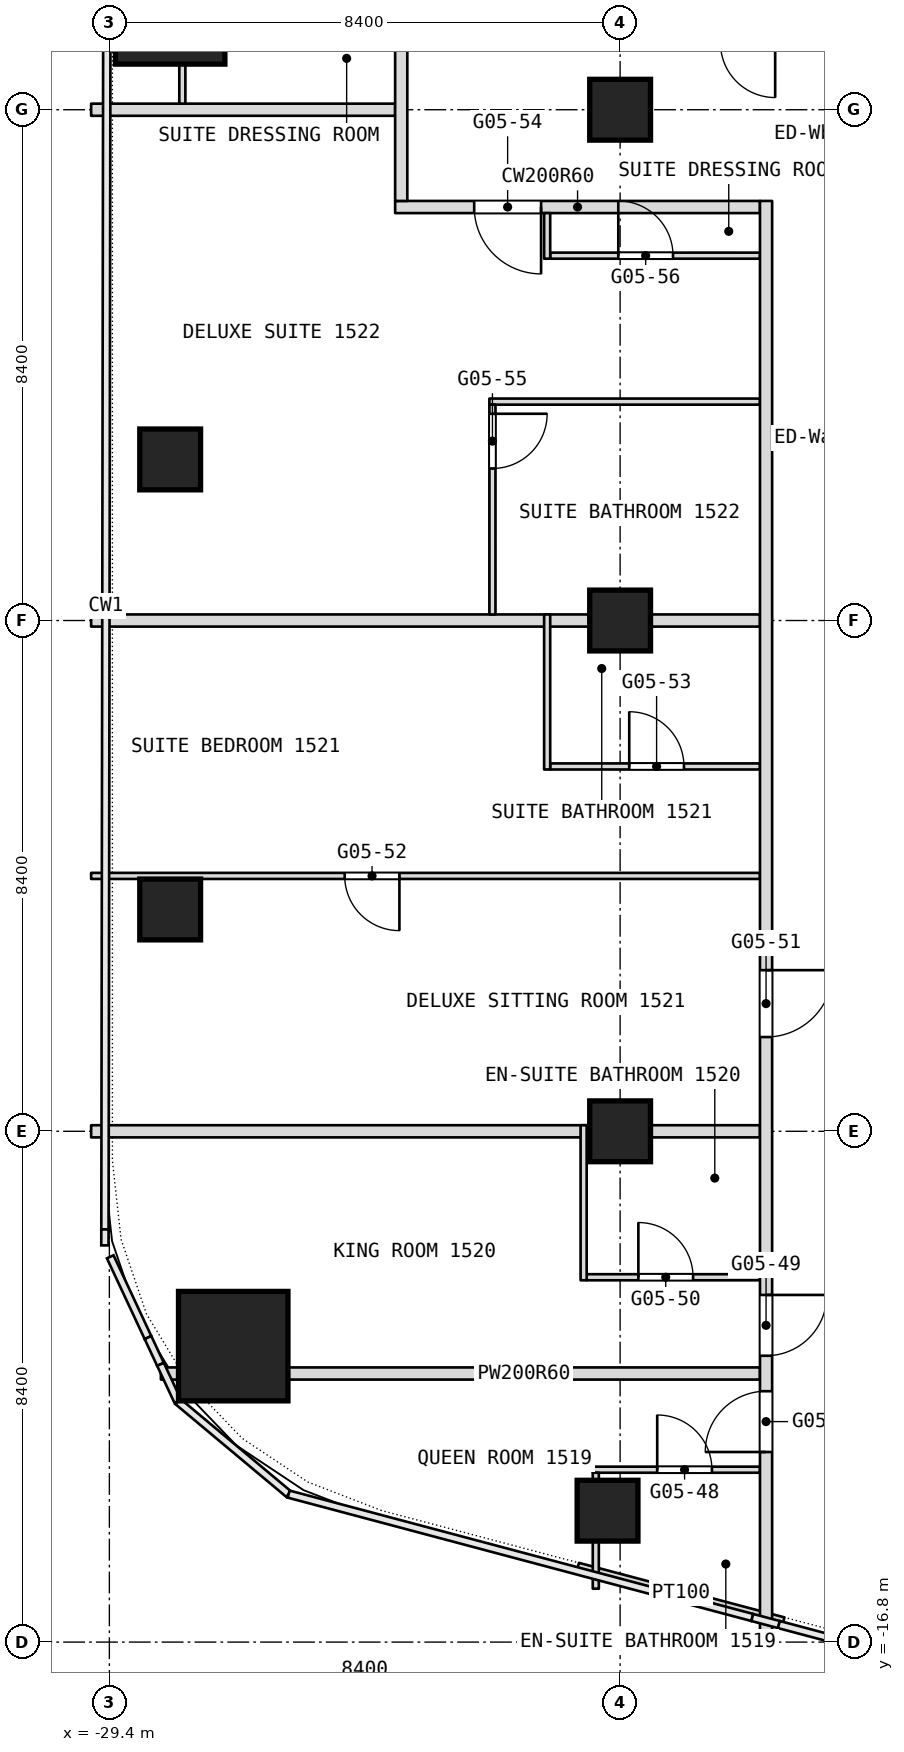
"""IFC4 building model, lengths in metres.
Left out: names, types, materials, properties, quantities, classifications, styles, units other than length and angle.
Written with IfcOpenShell. Run it as: python <this file> out.ifc"""

import sys

from ifc_helpers import new_model, si_unit, direction, frame, frame_2d, origin, origin_2d, place, context, subcontext, project, spatial, rectangle, extrude, element, fill, save


model = new_model("IFC4")
c1 = context("Model", 3, precision=1e-05, world=origin(), true_north=direction((0.0, 1.0)))
c2 = subcontext(c1, "Body", "Model", "MODEL_VIEW")
j1 = project(units=[si_unit("LENGTHUNIT", "METRE"), si_unit("PLANEANGLEUNIT", "RADIAN")], contexts=[c1])
p1 = place(None, origin())
s1 = spatial("IfcSite", under=j1, at=p1, CompositionType="ELEMENT")
p2 = place(p1, origin())
s2 = spatial("IfcBuilding", under=s1, at=p2, CompositionType="ELEMENT")
p3 = place(p2, frame((0.0, 0.0, 68.9)))
s3 = spatial("IfcBuildingStorey", under=s2, at=p3, CompositionType="ELEMENT", Elevation=68.9)
for number, where, z_axis, x_axis in (
    (1, (-27.363, -11.933, 0.0), (0.0, 0.0, 1.0), (1.0, 0.0, 0.0)),
    (2, (-28.4, 10.05, 0.0), (0.0, 0.0, 1.0), (1.0, 0.0, 0.0)),
):
    element("IfcColumn", number, at=place(p3, frame(where, z_axis=z_axis, x_axis=x_axis)), inside=s3, PredefinedType="COLUMN", context=c2, shape_type="SweptSolid", body=[
        extrude(rectangle(XDim=1.8, YDim=1.8, at=origin_2d()), origin(), (0.0, 0.0, 1.0), 3.6),
    ])
for number, where, z_axis, x_axis in (
    (3, (-21.0, -8.4, 0.0), (0.0, 0.0, 1.0), (1.0, 0.0, 0.0)),
    (4, (-21.0, 0.0, 0.0), (0.0, 0.0, 1.0), (1.0, 0.0, 0.0)),
    (5, (-21.0, 8.4, 0.0), (0.0, 0.0, 1.0), (1.0, 0.0, 0.0)),
    (6, (-28.4, -4.752, 0.0), (0.0, 0.0, 1.0), (1.0, 0.0, 0.0)),
    (7, (-28.4, 2.649, 0.0), (0.0, 0.0, 1.0), (1.0, 0.0, 0.0)),
    (8, (-21.207, -14.639, 0.0), (0.0, 0.0, 1.0), (1.0, 0.0, 0.0)),
):
    element("IfcColumn", number, at=place(p3, frame(where, z_axis=z_axis, x_axis=x_axis)), inside=s3, PredefinedType="COLUMN", context=c2, shape_type="SweptSolid", body=[
        extrude(rectangle(XDim=1.0, YDim=1.0, at=origin_2d()), origin(), (0.0, 0.0, 1.0), 3.6),
    ])
p4 = place(p3, frame((-21.69, -15.545, 0.0), z_axis=(0.0, 0.0, 1.0), x_axis=(0.966542484633, -0.25650657964, 0.0)))
e9 = element("IfcWall", 9, at=p4, inside=s3, PredefinedType="PARTITIONING", context=c2, shape_type="SweptSolid", body=[
    extrude(rectangle(XDim=3.497, YDim=0.1, at=frame_2d((1.749, 0.0))), origin(), (0.0, 0.0, 1.0), 3.34),
])
p5 = place(p3, frame((-21.45, -13.965, 0.0), z_axis=(0.0, 0.0, 1.0), x_axis=(1.0, 0.0, 0.0)))
e10 = element("IfcWall", 10, at=p5, inside=s3, PredefinedType="PARTITIONING", context=c2, shape_type="SweptSolid", body=[
    extrude(rectangle(XDim=2.75, YDim=0.1, at=frame_2d((1.375, 0.0))), origin(), (0.0, 0.0, 1.0), 3.34),
])
p6 = place(p5, frame((1.06, 0.0, 0.0)))
e11 = element("IfcOpeningElement", 11, at=p6, cuts=e10, PredefinedType="OPENING", context=c2, shape_type="SweptSolid", body=[
    extrude(rectangle(XDim=0.9, YDim=2.1, at=frame_2d((0.45, 1.05))), frame((0.0, 0.05, 0.0), z_axis=(0.0, -1.0, 0.0), x_axis=(1.0, 0.0, 0.0)), (0.0, 0.0, 1.0), 0.1),
])
p7 = place(p3, frame((-28.553, -12.383, 0.0), z_axis=(0.0, 0.0, 1.0), x_axis=(1.0, 0.0, 0.0)))
e12 = element("IfcWall", 12, at=p7, inside=s3, PredefinedType="PARTITIONING", context=c2, shape_type="SweptSolid", body=[
    extrude(rectangle(XDim=0.29, YDim=0.2, at=frame_2d((0.145, 0.0))), origin(), (0.0, 0.0, 1.0), 3.34),
])
p8 = place(p3, frame((-26.463, -12.383, 0.0), z_axis=(0.0, 0.0, 1.0), x_axis=(1.0, 0.0, 0.0)))
e13 = element("IfcWall", 13, at=p8, inside=s3, PredefinedType="PARTITIONING", context=c2, shape_type="SweptSolid", body=[
    extrude(rectangle(XDim=7.763, YDim=0.2, at=frame_2d((3.881, 0.0))), origin(), (0.0, 0.0, 1.0), 3.34),
])
p9 = place(p3, frame((-21.55, -10.8, 0.0), z_axis=(0.0, 0.0, 1.0), x_axis=(1.0, 0.0, 0.0)))
e14 = element("IfcWall", 14, at=p9, inside=s3, PredefinedType="PARTITIONING", context=c2, shape_type="SweptSolid", body=[
    extrude(rectangle(XDim=2.85, YDim=0.1, at=frame_2d((1.425, 0.0))), origin(), (0.0, 0.0, 1.0), 3.34),
])
p10 = place(p9, frame((0.85, 0.0, 0.0)))
e15 = element("IfcOpeningElement", 15, at=p10, cuts=e14, PredefinedType="OPENING", context=c2, shape_type="SweptSolid", body=[
    extrude(rectangle(XDim=0.9, YDim=2.1, at=frame_2d((0.45, 1.05))), frame((0.0, 0.05, 0.0), z_axis=(0.0, -1.0, 0.0), x_axis=(1.0, 0.0, 0.0)), (0.0, 0.0, 1.0), 0.1),
])
p11 = place(p3, frame((-29.7, -8.4, 0.0), z_axis=(0.0, 0.0, 1.0), x_axis=(1.0, 0.0, 0.0)))
e16 = element("IfcWall", 16, at=p11, inside=s3, PredefinedType="PARTITIONING", context=c2, shape_type="SweptSolid", body=[
    extrude(rectangle(XDim=11.0, YDim=0.2, at=frame_2d((5.5, 0.0))), origin(), (0.0, 0.0, 1.0), 2.84),
])
p12 = place(p3, frame((-29.7, -4.2, 0.0), z_axis=(0.0, 0.0, 1.0), x_axis=(1.0, 0.0, 0.0)))
e17 = element("IfcWall", 17, at=p12, inside=s3, PredefinedType="PARTITIONING", context=c2, shape_type="SweptSolid", body=[
    extrude(rectangle(XDim=11.0, YDim=0.1, at=frame_2d((5.5, 0.0))), origin(), (0.0, 0.0, 1.0), 3.34),
])
p13 = place(p12, frame((4.17, 0.0, 0.0)))
e18 = element("IfcOpeningElement", 18, at=p13, cuts=e17, PredefinedType="OPENING", context=c2, shape_type="SweptSolid", body=[
    extrude(rectangle(XDim=0.9, YDim=2.1, at=frame_2d((0.45, 1.05))), frame((0.0, 0.05, 0.0), z_axis=(0.0, -1.0, 0.0), x_axis=(1.0, 0.0, 0.0)), (0.0, 0.0, 1.0), 0.1),
])
p14 = place(p3, frame((-22.15, -2.4, 0.0), z_axis=(0.0, 0.0, 1.0), x_axis=(1.0, 0.0, 0.0)))
e19 = element("IfcWall", 19, at=p14, inside=s3, PredefinedType="PARTITIONING", context=c2, shape_type="SweptSolid", body=[
    extrude(rectangle(XDim=3.45, YDim=0.1, at=frame_2d((1.725, 0.0))), origin(), (0.0, 0.0, 1.0), 3.34),
])
p15 = place(p14, frame((1.3, 0.0, 0.0)))
e20 = element("IfcOpeningElement", 20, at=p15, cuts=e19, PredefinedType="OPENING", context=c2, shape_type="SweptSolid", body=[
    extrude(rectangle(XDim=0.9, YDim=2.1, at=frame_2d((0.45, 1.05))), frame((0.0, 0.05, 0.0), z_axis=(0.0, -1.0, 0.0), x_axis=(1.0, 0.0, 0.0)), (0.0, 0.0, 1.0), 0.1),
])
p16 = place(p3, frame((-29.7, 0.0, 0.0), z_axis=(0.0, 0.0, 1.0), x_axis=(1.0, 0.0, 0.0)))
e21 = element("IfcWall", 21, at=p16, inside=s3, PredefinedType="PARTITIONING", context=c2, shape_type="SweptSolid", body=[
    extrude(rectangle(XDim=11.0, YDim=0.2, at=frame_2d((5.5, 0.0))), origin(), (0.0, 0.0, 1.0), 2.84),
])
p17 = place(p3, frame((-23.15, 3.6, 0.0), z_axis=(0.0, 0.0, 1.0), x_axis=(1.0, 0.0, 0.0)))
e22 = element("IfcWall", 22, at=p17, inside=s3, PredefinedType="PARTITIONING", context=c2, shape_type="SweptSolid", body=[
    extrude(rectangle(XDim=4.45, YDim=0.1, at=frame_2d((2.225, 0.0))), origin(), (0.0, 0.0, 1.0), 3.34),
])
p18 = place(p3, frame((-22.15, 6.0, 0.0), z_axis=(0.0, 0.0, 1.0), x_axis=(1.0, 0.0, 0.0)))
e23 = element("IfcWall", 23, at=p18, inside=s3, PredefinedType="PARTITIONING", context=c2, shape_type="SweptSolid", body=[
    extrude(rectangle(XDim=3.45, YDim=0.1, at=frame_2d((1.725, 0.0))), origin(), (0.0, 0.0, 1.0), 3.34),
])
p19 = place(p18, frame((1.12, 0.0, 0.0)))
e24 = element("IfcOpeningElement", 24, at=p19, cuts=e23, PredefinedType="OPENING", context=c2, shape_type="SweptSolid", body=[
    extrude(rectangle(XDim=0.9, YDim=2.1, at=frame_2d((0.45, 1.05))), frame((0.0, 0.05, 0.0), z_axis=(0.0, -1.0, 0.0), x_axis=(1.0, 0.0, 0.0)), (0.0, 0.0, 1.0), 0.1),
])
p20 = place(p3, frame((-24.7, 6.8, 0.0), z_axis=(0.0, 0.0, 1.0), x_axis=(1.0, 0.0, 0.0)))
e25 = element("IfcWall", 25, at=p20, inside=s3, PredefinedType="PARTITIONING", context=c2, shape_type="SweptSolid", body=[
    extrude(rectangle(XDim=6.0, YDim=0.2, at=frame_2d((3.0, 0.0))), origin(), (0.0, 0.0, 1.0), 3.34),
])
p21 = place(p20, frame((1.3, 0.0, 0.0)))
e26 = element("IfcOpeningElement", 26, at=p21, cuts=e25, PredefinedType="OPENING", context=c2, shape_type="SweptSolid", body=[
    extrude(rectangle(XDim=1.1, YDim=2.1, at=frame_2d((0.55, 1.05))), frame((0.0, 0.1, 0.0), z_axis=(0.0, -1.0, 0.0), x_axis=(1.0, 0.0, 0.0)), (0.0, 0.0, 1.0), 0.2),
])
p22 = place(p3, frame((-29.7, 8.4, 0.0), z_axis=(0.0, 0.0, 1.0), x_axis=(1.0, 0.0, 0.0)))
e27 = element("IfcWall", 27, at=p22, inside=s3, PredefinedType="PARTITIONING", context=c2, shape_type="SweptSolid", body=[
    extrude(rectangle(XDim=5.0, YDim=0.2, at=frame_2d((2.5, 0.0))), origin(), (0.0, 0.0, 1.0), 2.84),
])
p23 = place(p3, frame((-18.6, -16.665, 0.0), z_axis=(0.0, 0.0, 1.0), x_axis=(0.0, 1.0, 0.0)))
e28 = element("IfcWall", 28, at=p23, inside=s3, PredefinedType="PARTITIONING", context=c2, shape_type="SweptSolid", body=[
    extrude(rectangle(XDim=23.565, YDim=0.2, at=frame_2d((11.782, 0.0))), origin(), (0.0, 0.0, 1.0), 3.34),
])
p24 = place(p23, frame((2.991, 0.0, 0.0)))
e29 = element("IfcOpeningElement", 29, at=p24, cuts=e28, PredefinedType="OPENING", context=c2, shape_type="SweptSolid", body=[
    extrude(rectangle(XDim=1.0, YDim=2.1, at=frame_2d((0.5, 1.05))), frame((0.0, 0.1, 0.0), z_axis=(0.0, -1.0, 0.0), x_axis=(1.0, 0.0, 0.0)), (0.0, 0.0, 1.0), 0.2),
])
p25 = place(p23, frame((4.574, 0.0, 0.0)))
e30 = element("IfcOpeningElement", 30, at=p25, cuts=e28, PredefinedType="OPENING", context=c2, shape_type="SweptSolid", body=[
    extrude(rectangle(XDim=1.0, YDim=2.1, at=frame_2d((0.5, 1.05))), frame((0.0, 0.1, 0.0), z_axis=(0.0, -1.0, 0.0), x_axis=(1.0, 0.0, 0.0)), (0.0, 0.0, 1.0), 0.2),
])
p26 = place(p23, frame((9.815, 0.0, 0.0)))
e31 = element("IfcOpeningElement", 31, at=p26, cuts=e28, PredefinedType="OPENING", context=c2, shape_type="SweptSolid", body=[
    extrude(rectangle(XDim=1.1, YDim=2.1, at=frame_2d((0.55, 1.05))), frame((0.0, 0.1, 0.0), z_axis=(0.0, -1.0, 0.0), x_axis=(1.0, 0.0, 0.0)), (0.0, 0.0, 1.0), 0.2),
])
p27 = place(p3, frame((-21.4, -15.922, 0.0), z_axis=(0.0, 0.0, 1.0), x_axis=(0.0, 1.0, 0.0)))
e32 = element("IfcWall", 32, at=p27, inside=s3, PredefinedType="PARTITIONING", context=c2, shape_type="SweptSolid", body=[
    extrude(rectangle(XDim=1.907, YDim=0.1, at=frame_2d((0.954, 0.0))), origin(), (0.0, 0.0, 1.0), 3.34),
])
for number, where, z_axis, x_axis in (
    (33, (-21.6, -10.85, 0.0), (0.0, 0.0, 1.0), (0.0, 1.0, 0.0)),
    (34, (-22.2, -2.45, 0.0), (0.0, 0.0, 1.0), (0.0, 1.0, 0.0)),
):
    element("IfcWall", number, at=place(p3, frame(where, z_axis=z_axis, x_axis=x_axis)), inside=s3, PredefinedType="PARTITIONING", context=c2, shape_type="SweptSolid", body=[
        extrude(rectangle(XDim=2.55, YDim=0.1, at=frame_2d((1.275, 0.0))), origin(), (0.0, 0.0, 1.0), 3.34),
    ])
p28 = place(p3, frame((-22.2, 5.95, 0.0), z_axis=(0.0, 0.0, 1.0), x_axis=(0.0, 1.0, 0.0)))
e35 = element("IfcWall", 35, at=p28, inside=s3, PredefinedType="PARTITIONING", context=c2, shape_type="SweptSolid", body=[
    extrude(rectangle(XDim=0.75, YDim=0.1, at=frame_2d((0.375, 0.0))), origin(), (0.0, 0.0, 1.0), 3.34),
])
p29 = place(p3, frame((-23.1, 0.1, 0.0), z_axis=(0.0, 0.0, 1.0), x_axis=(0.0, 1.0, 0.0)))
e36 = element("IfcWall", 36, at=p29, inside=s3, PredefinedType="PARTITIONING", context=c2, shape_type="SweptSolid", body=[
    extrude(rectangle(XDim=3.45, YDim=0.1, at=frame_2d((1.725, 0.0))), origin(), (0.0, 0.0, 1.0), 3.34),
])
p30 = place(p29, frame((2.4, 0.0, 0.0)))
e37 = element("IfcOpeningElement", 37, at=p30, cuts=e36, PredefinedType="OPENING", context=c2, shape_type="SweptSolid", body=[
    extrude(rectangle(XDim=0.9, YDim=2.1, at=frame_2d((0.45, 1.05))), frame((0.0, 0.05, 0.0), z_axis=(0.0, -1.0, 0.0), x_axis=(1.0, 0.0, 0.0)), (0.0, 0.0, 1.0), 0.1),
])
p31 = place(p3, frame((-24.6, 6.9, 0.0), z_axis=(0.0, 0.0, 1.0), x_axis=(0.0, 1.0, 0.0)))
e38 = element("IfcWall", 38, at=p31, inside=s3, PredefinedType="PARTITIONING", context=c2, shape_type="SweptSolid", body=[
    extrude(rectangle(XDim=11.6, YDim=0.2, at=frame_2d((5.8, 0.0))), origin(), (0.0, 0.0, 1.0), 3.34),
])
p32 = place(p31, frame((5.1, 0.0, 0.0)))
e39 = element("IfcOpeningElement", 39, at=p32, cuts=e38, PredefinedType="OPENING", context=c2, shape_type="SweptSolid", body=[
    extrude(rectangle(XDim=1.1, YDim=2.1, at=frame_2d((0.55, 1.05))), frame((0.0, 0.1, 0.0), z_axis=(0.0, -1.0, 0.0), x_axis=(1.0, 0.0, 0.0)), (0.0, 0.0, 1.0), 0.2),
])
p33 = place(p3, frame((-28.2, 8.5, 0.0), z_axis=(0.0, 0.0, 1.0), x_axis=(0.0, 1.0, 0.0)))
e40 = element("IfcWall", 40, at=p33, inside=s3, PredefinedType="PARTITIONING", context=c2, shape_type="SweptSolid", body=[
    extrude(rectangle(XDim=0.65, YDim=0.1, at=frame_2d((0.325, 0.0))), origin(), (0.0, 0.0, 1.0), 2.94),
])
p34 = place(p6, origin())
e41 = element("IfcDoor", 41, at=p34, inside=s3, OperationType="SINGLE_SWING_RIGHT", PredefinedType="DOOR", context=c2, shape_type="SweptSolid", body=[
    extrude(rectangle(XDim=0.9, YDim=2.1, at=frame_2d((0.45, 1.05))), frame((0.0, 0.025, 0.0), z_axis=(0.0, -1.0, 0.0), x_axis=(1.0, 0.0, 0.0)), (0.0, 0.0, 1.0), 0.05),
])
fill(e11, e41)
p35 = place(p10, origin())
e42 = element("IfcDoor", 42, at=p35, inside=s3, OperationType="SINGLE_SWING_LEFT", PredefinedType="DOOR", context=c2, shape_type="SweptSolid", body=[
    extrude(rectangle(XDim=0.9, YDim=2.1, at=frame_2d((0.45, 1.05))), frame((0.0, 0.025, 0.0), z_axis=(0.0, -1.0, 0.0), x_axis=(1.0, 0.0, 0.0)), (0.0, 0.0, 1.0), 0.05),
])
fill(e15, e42)
p36 = place(p13, origin())
e43 = element("IfcDoor", 43, at=p36, inside=s3, OperationType="SINGLE_SWING_LEFT", PredefinedType="DOOR", context=c2, shape_type="SweptSolid", body=[
    extrude(rectangle(XDim=0.9, YDim=2.1, at=frame_2d((0.45, 1.05))), frame((0.0, 0.025, 0.0), z_axis=(0.0, -1.0, 0.0), x_axis=(1.0, 0.0, 0.0)), (0.0, 0.0, 1.0), 0.05),
])
fill(e18, e43)
p37 = place(p15, origin())
e44 = element("IfcDoor", 44, at=p37, inside=s3, OperationType="SINGLE_SWING_RIGHT", PredefinedType="DOOR", context=c2, shape_type="SweptSolid", body=[
    extrude(rectangle(XDim=0.9, YDim=2.1, at=frame_2d((0.45, 1.05))), frame((0.0, 0.025, 0.0), z_axis=(0.0, -1.0, 0.0), x_axis=(1.0, 0.0, 0.0)), (0.0, 0.0, 1.0), 0.05),
])
fill(e20, e44)
p38 = place(p19, origin())
e45 = element("IfcDoor", 45, at=p38, inside=s3, OperationType="SINGLE_SWING_LEFT", PredefinedType="DOOR", context=c2, shape_type="SweptSolid", body=[
    extrude(rectangle(XDim=0.9, YDim=2.1, at=frame_2d((0.45, 1.05))), frame((0.0, 0.025, 0.0), z_axis=(0.0, -1.0, 0.0), x_axis=(1.0, 0.0, 0.0)), (0.0, 0.0, 1.0), 0.05),
])
fill(e24, e45)
p39 = place(p21, origin())
e46 = element("IfcDoor", 46, at=p39, inside=s3, OperationType="SINGLE_SWING_LEFT", PredefinedType="DOOR", context=c2, shape_type="SweptSolid", body=[
    extrude(rectangle(XDim=1.1, YDim=2.1, at=frame_2d((0.55, 1.05))), frame((0.0, 0.025, 0.0), z_axis=(0.0, -1.0, 0.0), x_axis=(1.0, 0.0, 0.0)), (0.0, 0.0, 1.0), 0.05),
])
fill(e26, e46)
p40 = place(p24, origin())
e47 = element("IfcDoor", 47, at=p40, inside=s3, OperationType="SINGLE_SWING_RIGHT", PredefinedType="DOOR", context=c2, shape_type="SweptSolid", body=[
    extrude(rectangle(XDim=1.0, YDim=2.1, at=frame_2d((0.5, 1.05))), frame((0.0, 0.025, 0.0), z_axis=(0.0, -1.0, 0.0), x_axis=(1.0, 0.0, 0.0)), (0.0, 0.0, 1.0), 0.05),
])
fill(e29, e47)
p41 = place(p25, origin())
e48 = element("IfcDoor", 48, at=p41, inside=s3, OperationType="SINGLE_SWING_RIGHT", PredefinedType="DOOR", context=c2, shape_type="SweptSolid", body=[
    extrude(rectangle(XDim=1.0, YDim=2.1, at=frame_2d((0.5, 1.05))), frame((0.0, 0.025, 0.0), z_axis=(0.0, -1.0, 0.0), x_axis=(1.0, 0.0, 0.0)), (0.0, 0.0, 1.0), 0.05),
])
fill(e30, e48)
p42 = place(p26, origin())
e49 = element("IfcDoor", 49, at=p42, inside=s3, OperationType="SINGLE_SWING_RIGHT", PredefinedType="DOOR", context=c2, shape_type="SweptSolid", body=[
    extrude(rectangle(XDim=1.1, YDim=2.1, at=frame_2d((0.55, 1.05))), frame((0.0, 0.025, 0.0), z_axis=(0.0, -1.0, 0.0), x_axis=(1.0, 0.0, 0.0)), (0.0, 0.0, 1.0), 0.05),
])
fill(e31, e49)
p43 = place(p30, origin())
e50 = element("IfcDoor", 50, at=p43, inside=s3, OperationType="SINGLE_SWING_LEFT", PredefinedType="DOOR", context=c2, shape_type="SweptSolid", body=[
    extrude(rectangle(XDim=0.9, YDim=2.1, at=frame_2d((0.45, 1.05))), frame((0.0, 0.025, 0.0), z_axis=(0.0, -1.0, 0.0), x_axis=(1.0, 0.0, 0.0)), (0.0, 0.0, 1.0), 0.05),
])
fill(e37, e50)
save(model, sys.argv[1])
